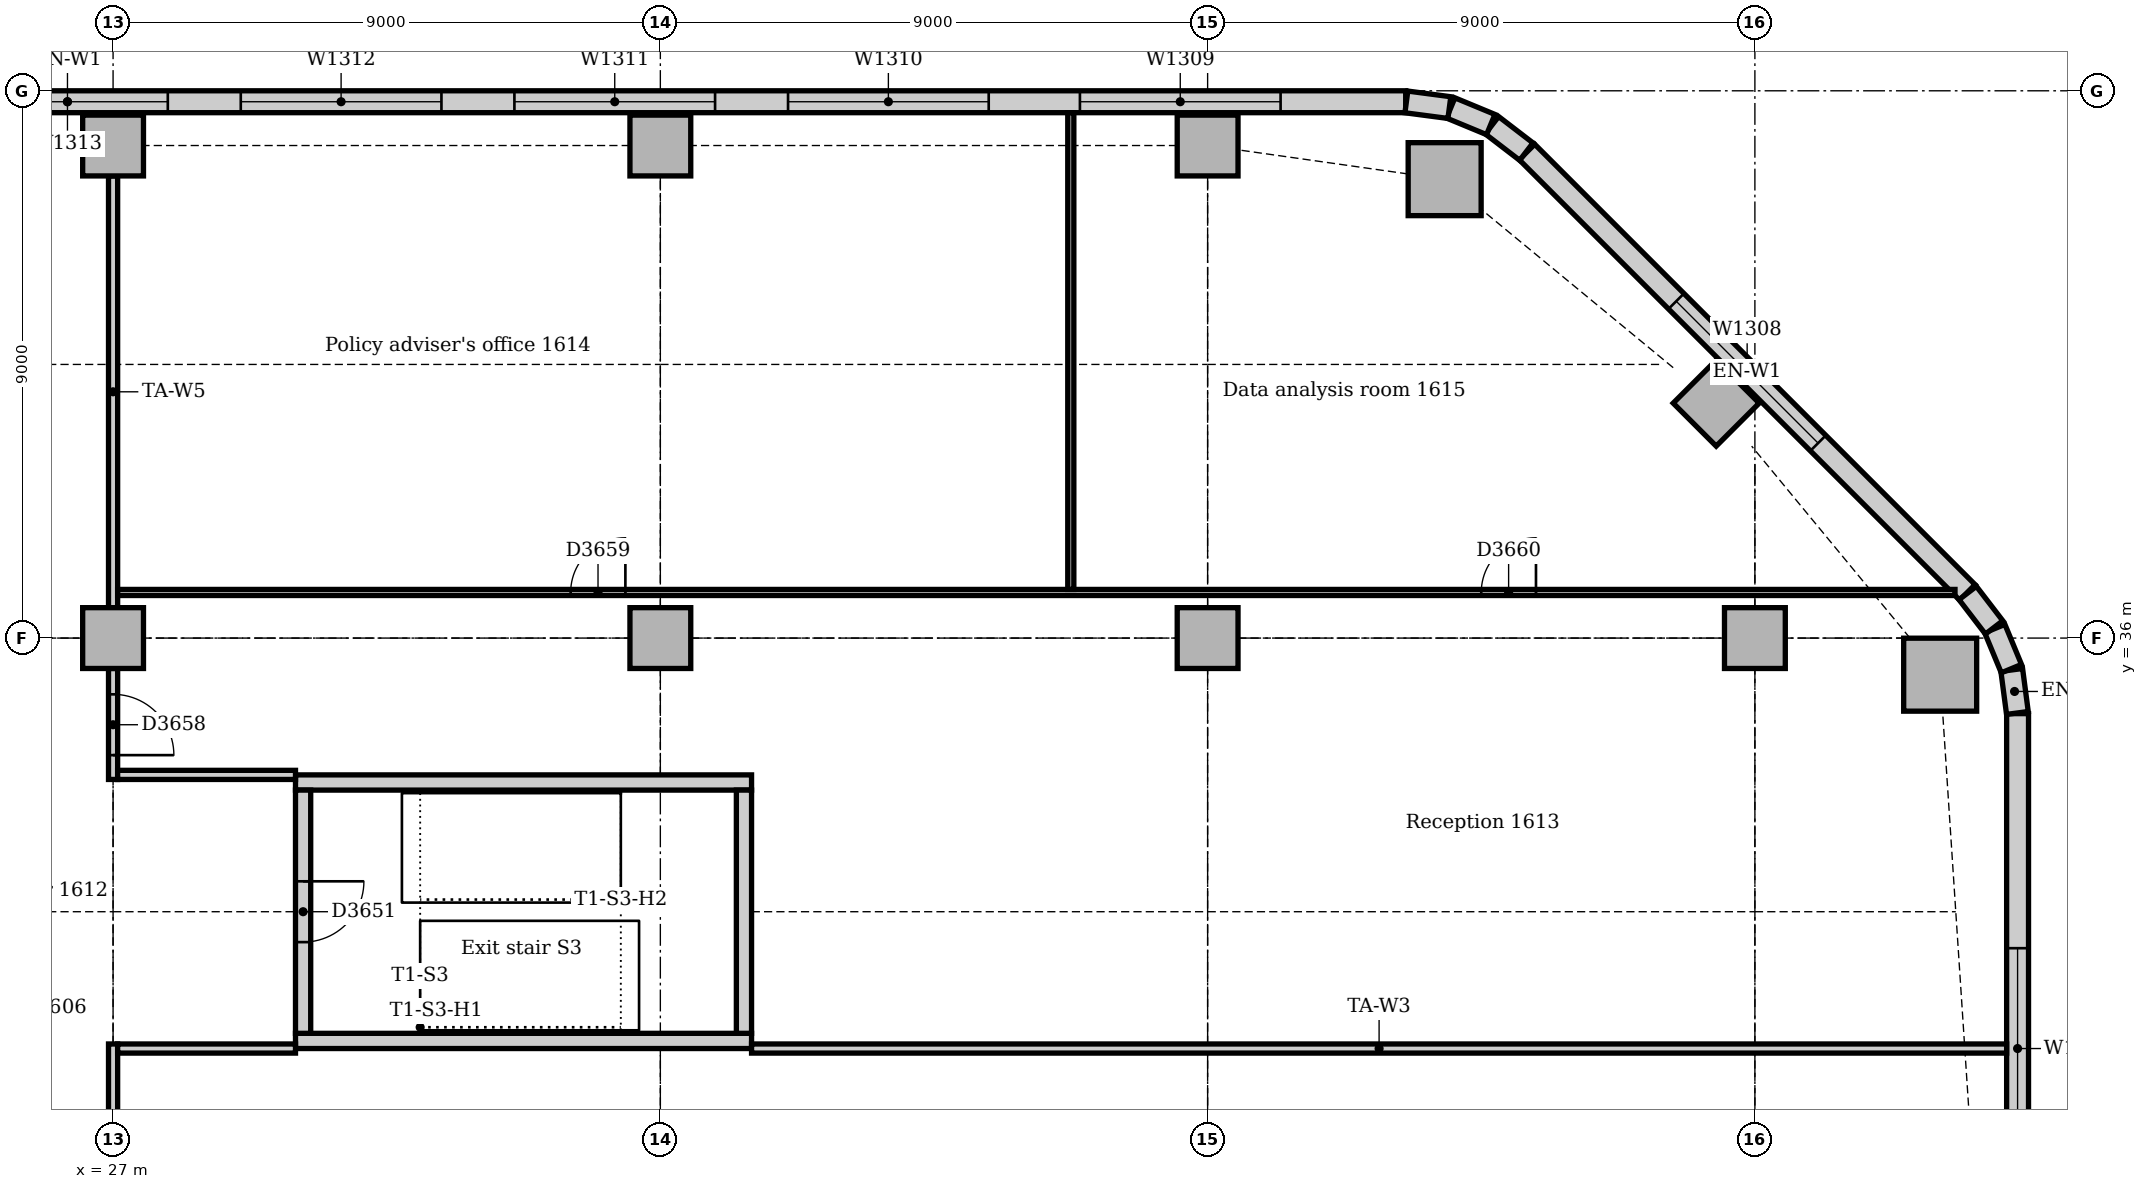
"""IFC4 building model, lengths in metres.
Left out: names, types, materials, properties, quantities, classifications, styles, units other than length and angle.
Written with IfcOpenShell. Run it as: python <this file> out.ifc"""

import sys

from ifc_helpers import new_model, si_unit, direction, frame, frame_2d, origin, origin_2d, place, context, subcontext, project, spatial, rectangle, extrude, element, fill, save


model = new_model("IFC4")
c1 = context("Model", 3, precision=1e-05, world=origin(), true_north=direction((0.0, 1.0)))
c2 = subcontext(c1, "Body", "Model", "MODEL_VIEW")
j1 = project(units=[si_unit("LENGTHUNIT", "METRE"), si_unit("PLANEANGLEUNIT", "RADIAN")], contexts=[c1])
p1 = place(None, origin())
s1 = spatial("IfcSite", under=j1, at=p1, CompositionType="ELEMENT")
p2 = place(p1, origin())
s2 = spatial("IfcBuilding", under=s1, at=p2, CompositionType="ELEMENT")
p3 = place(p2, frame((0.0, 0.0, 71.0)))
s3 = spatial("IfcBuildingStorey", under=s2, at=p3, CompositionType="ELEMENT", Elevation=71.0)
for number, where, z_axis, x_axis in (
    (1, (30.0, 29.375, 0.0), (0.0, 0.0, 1.0), (1.0, 0.0, 0.0)),
    (2, (37.5, 33.625, 0.0), (0.0, 0.0, 1.0), (-1.0, 0.0, 0.0)),
):
    element("IfcWall", number, at=place(p3, frame(where, z_axis=z_axis, x_axis=x_axis)), inside=s3, PredefinedType="SOLIDWALL", context=c2, shape_type="SweptSolid", body=[
        extrude(rectangle(XDim=7.5, YDim=0.25, at=frame_2d((3.75, 0.0))), origin(), (0.0, 0.0, 1.0), 4.0),
    ])
p4 = place(p3, frame((37.375, 29.5, 0.0), z_axis=(0.0, 0.0, 1.0), x_axis=(0.0, 1.0, 0.0)))
e3 = element("IfcWall", 3, at=p4, inside=s3, PredefinedType="SOLIDWALL", context=c2, shape_type="SweptSolid", body=[
    extrude(rectangle(XDim=4.0, YDim=0.25, at=frame_2d((2.0, 0.0))), origin(), (0.0, 0.0, 1.0), 4.0),
])
p5 = place(p3, frame((30.125, 33.5, 0.0), z_axis=(0.0, 0.0, 1.0), x_axis=(0.0, -1.0, 0.0)))
e4 = element("IfcWall", 4, at=p5, inside=s3, PredefinedType="SOLIDWALL", context=c2, shape_type="SweptSolid", body=[
    extrude(rectangle(XDim=4.0, YDim=0.25, at=frame_2d((2.0, 0.0))), origin(), (0.0, 0.0, 1.0), 4.0),
])
p6 = place(p5, frame((1.5, 0.0, 0.0)))
e5 = element("IfcOpeningElement", 5, at=p6, cuts=e4, PredefinedType="OPENING", context=c2, shape_type="SweptSolid", body=[
    extrude(rectangle(XDim=1.0, YDim=2.1, at=frame_2d((0.5, 1.05))), frame((0.0, 0.135, 0.0), z_axis=(0.0, -1.0, 0.0), x_axis=(1.0, 0.0, 0.0)), (0.0, 0.0, 1.0), 0.27),
])
for number, where, z_axis, x_axis in (
    (6, (57.047, 35.398, 0.0), (0.0, 0.0, 1.0), (1.0, 0.0, 0.0)),
    (7, (48.898, 43.547, 0.0), (0.0, 0.0, 1.0), (1.0, 0.0, 0.0)),
):
    element("IfcColumn", number, at=place(p3, frame(where, z_axis=z_axis, x_axis=x_axis)), inside=s3, PredefinedType="COLUMN", context=c2, shape_type="SweptSolid", body=[
        extrude(rectangle(XDim=1.2, YDim=1.2, at=origin_2d()), origin(), (0.0, 0.0, 1.0), 3.85),
    ])
for number, where, z_axis, x_axis in (
    (8, (53.364, 39.864, 0.0), (0.0, 0.0, 1.0), (0.707, 0.707, 0.0)),
    (9, (27.0, 44.1, 0.0), (0.0, 0.0, 1.0), (1.0, 0.0, 0.0)),
    (10, (36.0, 44.1, 0.0), (0.0, 0.0, 1.0), (1.0, 0.0, 0.0)),
    (11, (45.0, 44.1, 0.0), (0.0, 0.0, 1.0), (1.0, 0.0, 0.0)),
    (12, (27.0, 36.0, 0.0), (0.0, 0.0, 1.0), (1.0, 0.0, 0.0)),
    (13, (36.0, 36.0, 0.0), (0.0, 0.0, 1.0), (1.0, 0.0, 0.0)),
    (14, (45.0, 36.0, 0.0), (0.0, 0.0, 1.0), (1.0, 0.0, 0.0)),
    (15, (54.0, 36.0, 0.0), (0.0, 0.0, 1.0), (1.0, 0.0, 0.0)),
):
    element("IfcColumn", number, at=place(p3, frame(where, z_axis=z_axis, x_axis=x_axis)), inside=s3, PredefinedType="COLUMN", context=c2, shape_type="SweptSolid", body=[
        extrude(rectangle(XDim=1.0, YDim=1.0, at=origin_2d()), origin(), (0.0, 0.0, 1.0), 3.85),
    ])
p7 = place(p3, frame((58.32, 10.243, 0.0), z_axis=(0.0, 0.0, 1.0), x_axis=(0.0, 1.0, 0.0)))
e16 = element("IfcWall", 16, at=p7, inside=s3, PredefinedType="STANDARD", context=c2, shape_type="SweptSolid", body=[
    extrude(rectangle(XDim=24.515, YDim=0.36, at=frame_2d((12.257, 0.0))), origin(), (0.0, 0.0, 1.0), 3.85),
])
p8 = place(p7, frame((4.907, 0.0, 0.9)))
e17 = element("IfcOpeningElement", 17, at=p8, cuts=e16, PredefinedType="OPENING", context=c2, shape_type="SweptSolid", body=[
    extrude(rectangle(XDim=1.8, YDim=1.6, at=frame_2d((0.9, 0.8))), frame((0.0, 0.19, 0.0), z_axis=(0.0, -1.0, 0.0), x_axis=(1.0, 0.0, 0.0)), (0.0, 0.0, 1.0), 0.38),
])
p9 = place(p7, frame((8.757, 0.0, 0.9)))
e18 = element("IfcOpeningElement", 18, at=p9, cuts=e16, PredefinedType="OPENING", context=c2, shape_type="SweptSolid", body=[
    extrude(rectangle(XDim=1.8, YDim=1.6, at=frame_2d((0.9, 0.8))), frame((0.0, 0.19, 0.0), z_axis=(0.0, -1.0, 0.0), x_axis=(1.0, 0.0, 0.0)), (0.0, 0.0, 1.0), 0.38),
])
p10 = place(p7, frame((12.857, 0.0, 0.9)))
e19 = element("IfcOpeningElement", 19, at=p10, cuts=e16, PredefinedType="OPENING", context=c2, shape_type="SweptSolid", body=[
    extrude(rectangle(XDim=3.3, YDim=1.6, at=frame_2d((1.65, 0.8))), frame((0.0, 0.19, 0.0), z_axis=(0.0, -1.0, 0.0), x_axis=(1.0, 0.0, 0.0)), (0.0, 0.0, 1.0), 0.38),
])
p11 = place(p7, frame((17.357, 0.0, 0.9)))
e20 = element("IfcOpeningElement", 20, at=p11, cuts=e16, PredefinedType="OPENING", context=c2, shape_type="SweptSolid", body=[
    extrude(rectangle(XDim=3.3, YDim=1.6, at=frame_2d((1.65, 0.8))), frame((0.0, 0.19, 0.0), z_axis=(0.0, -1.0, 0.0), x_axis=(1.0, 0.0, 0.0)), (0.0, 0.0, 1.0), 0.38),
])
p12 = place(p3, frame((57.494, 36.751, 0.0), z_axis=(0.0, 0.0, 1.0), x_axis=(-0.707106781187, 0.707106781187, 0.0)))
e21 = element("IfcWall", 21, at=p12, inside=s3, PredefinedType="STANDARD", context=c2, shape_type="SweptSolid", body=[
    extrude(rectangle(XDim=10.243, YDim=0.36, at=frame_2d((5.121, 0.0))), origin(), (0.0, 0.0, 1.0), 3.85),
])
p13 = place(p12, frame((3.471, 0.0, 0.9)))
e22 = element("IfcOpeningElement", 22, at=p13, cuts=e21, PredefinedType="OPENING", context=c2, shape_type="SweptSolid", body=[
    extrude(rectangle(XDim=3.3, YDim=1.6, at=frame_2d((1.65, 0.8))), frame((0.0, 0.19, 0.0), z_axis=(0.0, -1.0, 0.0), x_axis=(1.0, 0.0, 0.0)), (0.0, 0.0, 1.0), 0.38),
])
p14 = place(p3, frame((48.257, 44.82, 0.0), z_axis=(0.0, 0.0, 1.0), x_axis=(-1.0, 0.0, 0.0)))
e23 = element("IfcWall", 23, at=p14, inside=s3, PredefinedType="STANDARD", context=c2, shape_type="SweptSolid", body=[
    extrude(rectangle(XDim=44.015, YDim=0.36, at=frame_2d((22.007, 0.0))), origin(), (0.0, 0.0, 1.0), 3.85),
])
p15 = place(p14, frame((2.057, 0.0, 0.9)))
e24 = element("IfcOpeningElement", 24, at=p15, cuts=e23, PredefinedType="OPENING", context=c2, shape_type="SweptSolid", body=[
    extrude(rectangle(XDim=3.3, YDim=1.6, at=frame_2d((1.65, 0.8))), frame((0.0, 0.19, 0.0), z_axis=(0.0, -1.0, 0.0), x_axis=(1.0, 0.0, 0.0)), (0.0, 0.0, 1.0), 0.38),
])
p16 = place(p14, frame((6.857, 0.0, 0.9)))
e25 = element("IfcOpeningElement", 25, at=p16, cuts=e23, PredefinedType="OPENING", context=c2, shape_type="SweptSolid", body=[
    extrude(rectangle(XDim=3.3, YDim=1.6, at=frame_2d((1.65, 0.8))), frame((0.0, 0.19, 0.0), z_axis=(0.0, -1.0, 0.0), x_axis=(1.0, 0.0, 0.0)), (0.0, 0.0, 1.0), 0.38),
])
p17 = place(p14, frame((11.357, 0.0, 0.9)))
e26 = element("IfcOpeningElement", 26, at=p17, cuts=e23, PredefinedType="OPENING", context=c2, shape_type="SweptSolid", body=[
    extrude(rectangle(XDim=3.3, YDim=1.6, at=frame_2d((1.65, 0.8))), frame((0.0, 0.19, 0.0), z_axis=(0.0, -1.0, 0.0), x_axis=(1.0, 0.0, 0.0)), (0.0, 0.0, 1.0), 0.38),
])
p18 = place(p14, frame((15.857, 0.0, 0.9)))
e27 = element("IfcOpeningElement", 27, at=p18, cuts=e23, PredefinedType="OPENING", context=c2, shape_type="SweptSolid", body=[
    extrude(rectangle(XDim=3.3, YDim=1.6, at=frame_2d((1.65, 0.8))), frame((0.0, 0.19, 0.0), z_axis=(0.0, -1.0, 0.0), x_axis=(1.0, 0.0, 0.0)), (0.0, 0.0, 1.0), 0.38),
])
p19 = place(p14, frame((20.357, 0.0, 0.9)))
e28 = element("IfcOpeningElement", 28, at=p19, cuts=e23, PredefinedType="OPENING", context=c2, shape_type="SweptSolid", body=[
    extrude(rectangle(XDim=3.3, YDim=1.6, at=frame_2d((1.65, 0.8))), frame((0.0, 0.19, 0.0), z_axis=(0.0, -1.0, 0.0), x_axis=(1.0, 0.0, 0.0)), (0.0, 0.0, 1.0), 0.38),
])
p20 = place(p14, frame((25.957, 0.0, 0.9)))
e29 = element("IfcOpeningElement", 29, at=p20, cuts=e23, PredefinedType="OPENING", context=c2, shape_type="SweptSolid", body=[
    extrude(rectangle(XDim=1.8, YDim=1.6, at=frame_2d((0.9, 0.8))), frame((0.0, 0.19, 0.0), z_axis=(0.0, -1.0, 0.0), x_axis=(1.0, 0.0, 0.0)), (0.0, 0.0, 1.0), 0.38),
])
p21 = place(p14, frame((29.357, 0.0, 0.9)))
e30 = element("IfcOpeningElement", 30, at=p21, cuts=e23, PredefinedType="OPENING", context=c2, shape_type="SweptSolid", body=[
    extrude(rectangle(XDim=3.3, YDim=1.6, at=frame_2d((1.65, 0.8))), frame((0.0, 0.19, 0.0), z_axis=(0.0, -1.0, 0.0), x_axis=(1.0, 0.0, 0.0)), (0.0, 0.0, 1.0), 0.38),
])
p22 = place(p14, frame((33.857, 0.0, 0.9)))
e31 = element("IfcOpeningElement", 31, at=p22, cuts=e23, PredefinedType="OPENING", context=c2, shape_type="SweptSolid", body=[
    extrude(rectangle(XDim=3.3, YDim=1.6, at=frame_2d((1.65, 0.8))), frame((0.0, 0.19, 0.0), z_axis=(0.0, -1.0, 0.0), x_axis=(1.0, 0.0, 0.0)), (0.0, 0.0, 1.0), 0.38),
])
p23 = place(p14, frame((38.357, 0.0, 0.9)))
e32 = element("IfcOpeningElement", 32, at=p23, cuts=e23, PredefinedType="OPENING", context=c2, shape_type="SweptSolid", body=[
    extrude(rectangle(XDim=3.3, YDim=1.6, at=frame_2d((1.65, 0.8))), frame((0.0, 0.19, 0.0), z_axis=(0.0, -1.0, 0.0), x_axis=(1.0, 0.0, 0.0)), (0.0, 0.0, 1.0), 0.38),
])
for number, where, z_axis, x_axis in (
    (33, (58.317, 34.769, 0.0), (0.0, 0.0, 1.0), (-0.131, 0.991, 0.0)),
    (34, (58.218, 35.497, 0.0), (0.0, 0.0, 1.0), (-0.383, 0.924, 0.0)),
):
    element("IfcWall", number, at=place(p3, frame(where, z_axis=z_axis, x_axis=x_axis)), inside=s3, PredefinedType="STANDARD", context=c2, shape_type="SweptSolid", body=[
        extrude(rectangle(XDim=0.713, YDim=0.36, at=frame_2d((0.356, 0.0))), origin(), (0.0, 0.0, 1.0), 3.85),
    ])
for number, where, z_axis, x_axis in (
    (35, (57.934, 36.175, 0.0), (0.0, 0.0, 1.0), (-0.609, 0.793, 0.0)),
    (36, (50.241, 44.0, 0.0), (0.0, 0.0, 1.0), (-0.793, 0.609, 0.0)),
):
    element("IfcWall", number, at=place(p3, frame(where, z_axis=z_axis, x_axis=x_axis)), inside=s3, PredefinedType="STANDARD", context=c2, shape_type="SweptSolid", body=[
        extrude(rectangle(XDim=0.713, YDim=0.36, at=frame_2d((0.357, 0.0))), origin(), (0.0, 0.0, 1.0), 3.85),
    ])
for number, where, z_axis, x_axis in (
    (37, (49.656, 44.445, 0.0), (0.0, 0.0, 1.0), (-0.924, 0.383, 0.0)),
    (38, (48.976, 44.724, 0.0), (0.0, 0.0, 1.0), (-0.991, 0.131, 0.0)),
):
    element("IfcWall", number, at=place(p3, frame(where, z_axis=z_axis, x_axis=x_axis)), inside=s3, PredefinedType="STANDARD", context=c2, shape_type="SweptSolid", body=[
        extrude(rectangle(XDim=0.713, YDim=0.36, at=frame_2d((0.356, 0.0))), origin(), (0.0, 0.0, 1.0), 3.85),
    ])
p24 = place(p3, frame((27.0, 33.675, 0.0), z_axis=(0.0, 0.0, 1.0), x_axis=(0.0, 1.0, 0.0)))
e39 = element("IfcWall", 39, at=p24, inside=s3, PredefinedType="PARTITIONING", context=c2, shape_type="SweptSolid", body=[
    extrude(rectangle(XDim=1.825, YDim=0.15, at=frame_2d((0.912, 0.0))), origin(), (0.0, 0.0, 1.0), 3.158),
])
p25 = place(p24, frame((0.4, 0.0, 0.0)))
e40 = element("IfcOpeningElement", 40, at=p25, cuts=e39, PredefinedType="OPENING", context=c2, shape_type="SweptSolid", body=[
    extrude(rectangle(XDim=1.0, YDim=2.1, at=frame_2d((0.5, 1.05))), frame((0.0, 0.085, 0.0), z_axis=(0.0, -1.0, 0.0), x_axis=(1.0, 0.0, 0.0)), (0.0, 0.0, 1.0), 0.17),
])
p26 = place(p3, frame((27.0, 36.5, 0.0), z_axis=(0.0, 0.0, 1.0), x_axis=(0.0, 1.0, 0.0)))
e41 = element("IfcWall", 41, at=p26, inside=s3, PredefinedType="PARTITIONING", context=c2, shape_type="SweptSolid", body=[
    extrude(rectangle(XDim=7.1, YDim=0.15, at=frame_2d((3.55, 0.0))), origin(), (0.0, 0.0, 1.0), 3.158),
])
p27 = place(p3, frame((27.0, 27.5, 0.0), z_axis=(0.0, 0.0, 1.0), x_axis=(0.0, 1.0, 0.0)))
e42 = element("IfcWall", 42, at=p27, inside=s3, PredefinedType="PARTITIONING", context=c2, shape_type="SweptSolid", body=[
    extrude(rectangle(XDim=1.825, YDim=0.15, at=frame_2d((0.912, 0.0))), origin(), (0.0, 0.0, 1.0), 3.158),
])
for number, where, z_axis, x_axis in (
    (43, (27.075, 29.25, 0.0), (0.0, 0.0, 1.0), (1.0, 0.0, 0.0)),
    (44, (27.075, 33.75, 0.0), (0.0, 0.0, 1.0), (1.0, 0.0, 0.0)),
):
    element("IfcWall", number, at=place(p3, frame(where, z_axis=z_axis, x_axis=x_axis)), inside=s3, PredefinedType="PARTITIONING", context=c2, shape_type="SweptSolid", body=[
        extrude(rectangle(XDim=2.925, YDim=0.15, at=frame_2d((1.462, 0.0))), origin(), (0.0, 0.0, 1.0), 3.85),
    ])
p28 = place(p3, frame((37.5, 29.25, 0.0), z_axis=(0.0, 0.0, 1.0), x_axis=(1.0, 0.0, 0.0)))
e45 = element("IfcWall", 45, at=p28, inside=s3, PredefinedType="PARTITIONING", context=c2, shape_type="SweptSolid", body=[
    extrude(rectangle(XDim=20.64, YDim=0.15, at=frame_2d((10.32, 0.0))), origin(), (0.0, 0.0, 1.0), 3.85),
])
p29 = place(p3, frame((27.075, 36.75, 0.0), z_axis=(0.0, 0.0, 1.0), x_axis=(1.0, 0.0, 0.0)))
e46 = element("IfcWall", 46, at=p29, inside=s3, PredefinedType="PARTITIONING", context=c2, shape_type="SweptSolid", body=[
    extrude(rectangle(XDim=30.216, YDim=0.1, at=frame_2d((15.108, 0.0))), origin(), (0.0, 0.0, 1.0), 3.85),
])
p30 = place(p29, frame((7.45, 0.0, 0.0)))
e47 = element("IfcOpeningElement", 47, at=p30, cuts=e46, PredefinedType="OPENING", context=c2, shape_type="SweptSolid", body=[
    extrude(rectangle(XDim=0.9, YDim=2.1, at=frame_2d((0.45, 1.05))), frame((0.0, 0.06, 0.0), z_axis=(0.0, -1.0, 0.0), x_axis=(1.0, 0.0, 0.0)), (0.0, 0.0, 1.0), 0.12),
])
p31 = place(p29, frame((22.425, 0.0, 0.0)))
e48 = element("IfcOpeningElement", 48, at=p31, cuts=e46, PredefinedType="OPENING", context=c2, shape_type="SweptSolid", body=[
    extrude(rectangle(XDim=0.9, YDim=2.1, at=frame_2d((0.45, 1.05))), frame((0.0, 0.06, 0.0), z_axis=(0.0, -1.0, 0.0), x_axis=(1.0, 0.0, 0.0)), (0.0, 0.0, 1.0), 0.12),
])
p32 = place(p3, frame((42.75, 36.8, 0.0), z_axis=(0.0, 0.0, 1.0), x_axis=(0.0, 1.0, 0.0)))
e49 = element("IfcWall", 49, at=p32, inside=s3, PredefinedType="PARTITIONING", context=c2, shape_type="SweptSolid", body=[
    extrude(rectangle(XDim=7.84, YDim=0.1, at=frame_2d((3.92, 0.0))), origin(), (0.0, 0.0, 1.0), 3.85),
])
p33 = place(p11, origin())
e50 = element("IfcWindow", 50, at=p33, inside=s3, PartitioningType="SINGLE_PANEL", PredefinedType="WINDOW", context=c2, shape_type="SweptSolid", body=[
    extrude(rectangle(XDim=3.3, YDim=1.6, at=frame_2d((1.65, 0.8))), frame((0.0, 0.13, 0.0), z_axis=(0.0, -1.0, 0.0), x_axis=(1.0, 0.0, 0.0)), (0.0, 0.0, 1.0), 0.06),
])
fill(e20, e50)
p34 = place(p13, origin())
e51 = element("IfcWindow", 51, at=p34, inside=s3, PartitioningType="SINGLE_PANEL", PredefinedType="WINDOW", context=c2, shape_type="SweptSolid", body=[
    extrude(rectangle(XDim=3.3, YDim=1.6, at=frame_2d((1.65, 0.8))), frame((0.0, 0.13, 0.0), z_axis=(0.0, -1.0, 0.0), x_axis=(1.0, 0.0, 0.0)), (0.0, 0.0, 1.0), 0.06),
])
fill(e22, e51)
p35 = place(p15, origin())
e52 = element("IfcWindow", 52, at=p35, inside=s3, PartitioningType="SINGLE_PANEL", PredefinedType="WINDOW", context=c2, shape_type="SweptSolid", body=[
    extrude(rectangle(XDim=3.3, YDim=1.6, at=frame_2d((1.65, 0.8))), frame((0.0, 0.13, 0.0), z_axis=(0.0, -1.0, 0.0), x_axis=(1.0, 0.0, 0.0)), (0.0, 0.0, 1.0), 0.06),
])
fill(e24, e52)
p36 = place(p16, origin())
e53 = element("IfcWindow", 53, at=p36, inside=s3, PartitioningType="SINGLE_PANEL", PredefinedType="WINDOW", context=c2, shape_type="SweptSolid", body=[
    extrude(rectangle(XDim=3.3, YDim=1.6, at=frame_2d((1.65, 0.8))), frame((0.0, 0.13, 0.0), z_axis=(0.0, -1.0, 0.0), x_axis=(1.0, 0.0, 0.0)), (0.0, 0.0, 1.0), 0.06),
])
fill(e25, e53)
p37 = place(p17, origin())
e54 = element("IfcWindow", 54, at=p37, inside=s3, PartitioningType="SINGLE_PANEL", PredefinedType="WINDOW", context=c2, shape_type="SweptSolid", body=[
    extrude(rectangle(XDim=3.3, YDim=1.6, at=frame_2d((1.65, 0.8))), frame((0.0, 0.13, 0.0), z_axis=(0.0, -1.0, 0.0), x_axis=(1.0, 0.0, 0.0)), (0.0, 0.0, 1.0), 0.06),
])
fill(e26, e54)
p38 = place(p18, origin())
e55 = element("IfcWindow", 55, at=p38, inside=s3, PartitioningType="SINGLE_PANEL", PredefinedType="WINDOW", context=c2, shape_type="SweptSolid", body=[
    extrude(rectangle(XDim=3.3, YDim=1.6, at=frame_2d((1.65, 0.8))), frame((0.0, 0.13, 0.0), z_axis=(0.0, -1.0, 0.0), x_axis=(1.0, 0.0, 0.0)), (0.0, 0.0, 1.0), 0.06),
])
fill(e27, e55)
p39 = place(p19, origin())
e56 = element("IfcWindow", 56, at=p39, inside=s3, PartitioningType="SINGLE_PANEL", PredefinedType="WINDOW", context=c2, shape_type="SweptSolid", body=[
    extrude(rectangle(XDim=3.3, YDim=1.6, at=frame_2d((1.65, 0.8))), frame((0.0, 0.13, 0.0), z_axis=(0.0, -1.0, 0.0), x_axis=(1.0, 0.0, 0.0)), (0.0, 0.0, 1.0), 0.06),
])
fill(e28, e56)
p40 = place(p6, origin())
e57 = element("IfcDoor", 57, at=p40, inside=s3, OperationType="SINGLE_SWING_LEFT", PredefinedType="DOOR", context=c2, shape_type="SweptSolid", body=[
    extrude(rectangle(XDim=1.0, YDim=2.1, at=frame_2d((0.5, 1.05))), frame((0.0, 0.025, 0.0), z_axis=(0.0, -1.0, 0.0), x_axis=(1.0, 0.0, 0.0)), (0.0, 0.0, 1.0), 0.05),
])
fill(e5, e57)
p41 = place(p25, frame((1.0, 0.0, 0.0), z_axis=(0.0, 0.0, 1.0), x_axis=(-1.0, 0.0, 0.0)))
e58 = element("IfcDoor", 58, at=p41, inside=s3, OperationType="SINGLE_SWING_RIGHT", PredefinedType="DOOR", context=c2, shape_type="SweptSolid", body=[
    extrude(rectangle(XDim=1.0, YDim=2.1, at=frame_2d((0.5, 1.05))), frame((0.0, 0.025, 0.0), z_axis=(0.0, -1.0, 0.0), x_axis=(1.0, 0.0, 0.0)), (0.0, 0.0, 1.0), 0.05),
])
fill(e40, e58)
p42 = place(p30, origin())
e59 = element("IfcDoor", 59, at=p42, inside=s3, OperationType="SINGLE_SWING_RIGHT", PredefinedType="DOOR", context=c2, shape_type="SweptSolid", body=[
    extrude(rectangle(XDim=0.9, YDim=2.1, at=frame_2d((0.45, 1.05))), frame((0.0, 0.025, 0.0), z_axis=(0.0, -1.0, 0.0), x_axis=(1.0, 0.0, 0.0)), (0.0, 0.0, 1.0), 0.05),
])
fill(e47, e59)
p43 = place(p31, origin())
e60 = element("IfcDoor", 60, at=p43, inside=s3, OperationType="SINGLE_SWING_RIGHT", PredefinedType="DOOR", context=c2, shape_type="SweptSolid", body=[
    extrude(rectangle(XDim=0.9, YDim=2.1, at=frame_2d((0.45, 1.05))), frame((0.0, 0.025, 0.0), z_axis=(0.0, -1.0, 0.0), x_axis=(1.0, 0.0, 0.0)), (0.0, 0.0, 1.0), 0.05),
])
fill(e48, e60)
save(model, sys.argv[1])
